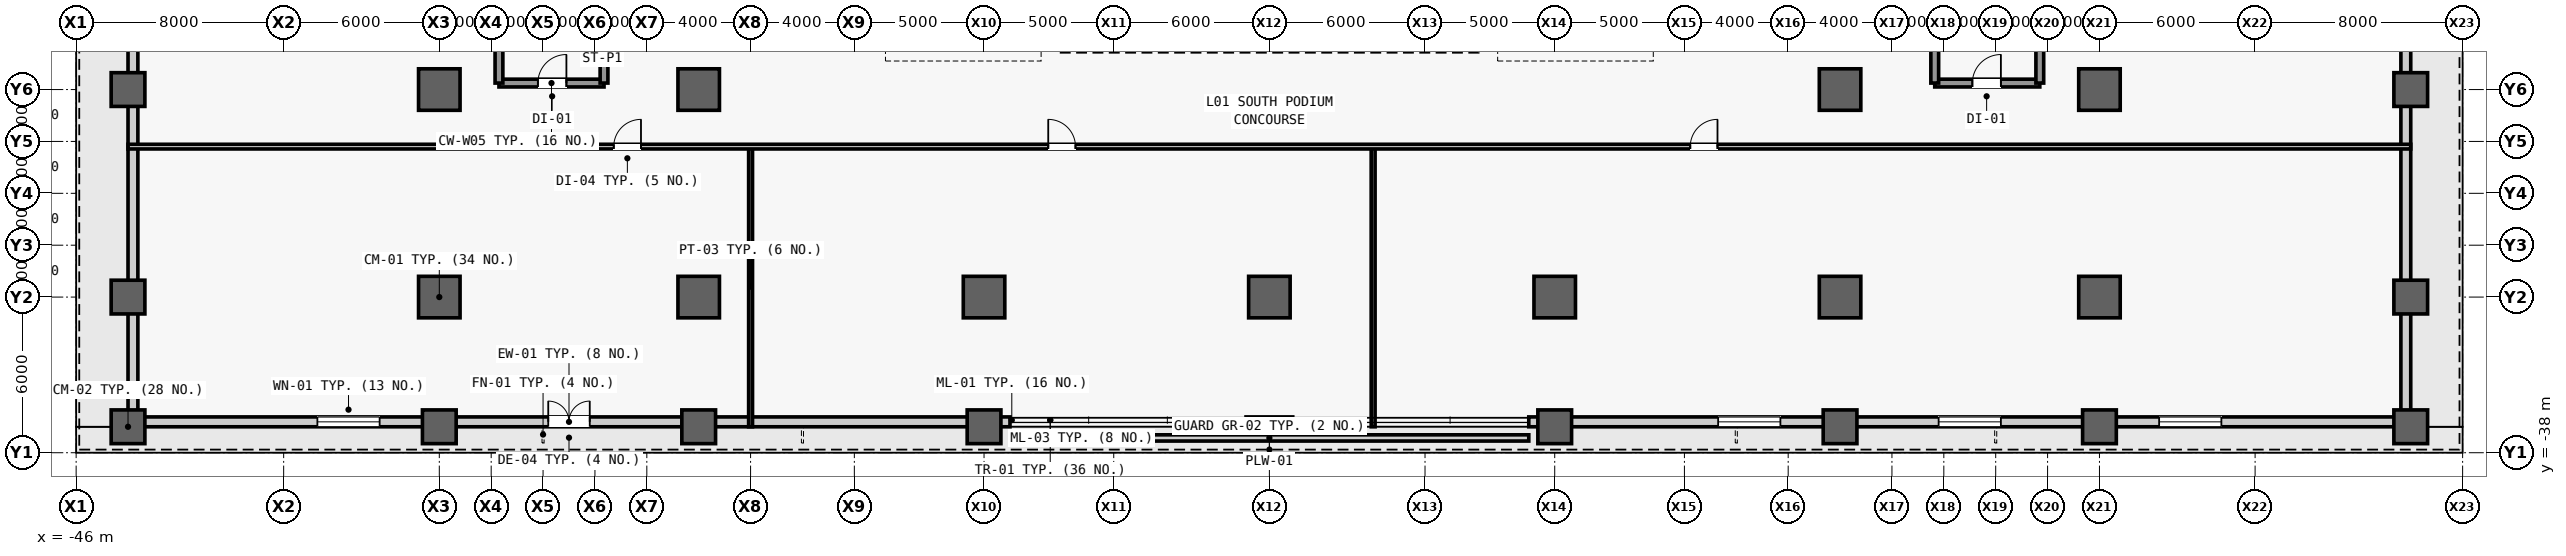
"""IFC4 building model, lengths in metres.
Left out: names, types, materials, properties, quantities, classifications, styles, units other than length and angle.
Written with IfcOpenShell. Run it as: python <this file> out.ifc"""

import sys

from ifc_helpers import new_model, si_unit, direction, frame, frame_2d, origin, origin_2d, place, context, subcontext, project, spatial, rectangle, extrude, source, transform, mapped, element, fill, save


model = new_model("IFC4")
c1 = context("Model", 3, precision=1e-05, world=origin(), true_north=direction((0.0, 1.0)))
c2 = subcontext(c1, "Body", "Model", "MODEL_VIEW")
j1 = project(units=[si_unit("LENGTHUNIT", "METRE"), si_unit("PLANEANGLEUNIT", "RADIAN")], contexts=[c1])
p1 = place(None, origin())
s1 = spatial("IfcSite", under=j1, at=p1, CompositionType="ELEMENT")
p2 = place(p1, origin())
s2 = spatial("IfcBuilding", under=s1, at=p2, CompositionType="ELEMENT")
p3 = place(p2, frame((0.0, 0.0, 6.6)))
s3 = spatial("IfcBuildingStorey", under=s2, at=p3, CompositionType="ELEMENT", Elevation=6.6)
m1 = source(origin(), c2, "Body", "SweptSolid", [
    extrude(rectangle(XDim=1.3, YDim=1.3, at=origin_2d()), origin(), (0.0, 0.0, 1.0), 5.4),
])
for number, where, z_axis, x_axis in (
    (1, (-44.0, -37.0, 0.0), (0.0, 0.0, 1.0), (1.0, 0.0, 0.0)),
    (2, (-44.0, -24.0, 0.0), (0.0, 0.0, 1.0), (1.0, 0.0, 0.0)),
    (3, (-32.0, -37.0, 0.0), (0.0, 0.0, 1.0), (1.0, 0.0, 0.0)),
):
    element("IfcColumn", number, at=place(p3, frame(where, z_axis=z_axis, x_axis=x_axis)), inside=s3, PredefinedType="COLUMN", context=c2, shape_type="MappedRepresentation", body=[
        mapped(m1, transform((0.0, 0.0, 0.0), scale=1.0)),
    ])
m2 = source(origin(), c2, "Body", "SweptSolid", [
    extrude(rectangle(XDim=1.6, YDim=1.6, at=origin_2d()), origin(), (0.0, 0.0, 1.0), 5.4),
])
for number, where, z_axis, x_axis in (
    (4, (-32.0, -32.0, 0.0), (0.0, 0.0, 1.0), (1.0, 0.0, 0.0)),
    (5, (-32.0, -24.0, 0.0), (0.0, 0.0, 1.0), (1.0, 0.0, 0.0)),
):
    element("IfcColumn", number, at=place(p3, frame(where, z_axis=z_axis, x_axis=x_axis)), inside=s3, PredefinedType="COLUMN", context=c2, shape_type="MappedRepresentation", body=[
        mapped(m2, transform((0.0, 0.0, 0.0), scale=1.0)),
    ])
p4 = place(p3, frame((-22.0, -37.0, 0.0), z_axis=(0.0, 0.0, 1.0), x_axis=(1.0, 0.0, 0.0)))
e6 = element("IfcColumn", 6, at=p4, inside=s3, PredefinedType="COLUMN", context=c2, shape_type="MappedRepresentation", body=[
    mapped(m1, transform((0.0, 0.0, 0.0), scale=1.0)),
])
for number, where, z_axis, x_axis in (
    (7, (-22.0, -32.0, 0.0), (0.0, 0.0, 1.0), (1.0, 0.0, 0.0)),
    (8, (-22.0, -24.0, 0.0), (0.0, 0.0, 1.0), (1.0, 0.0, 0.0)),
):
    element("IfcColumn", number, at=place(p3, frame(where, z_axis=z_axis, x_axis=x_axis)), inside=s3, PredefinedType="COLUMN", context=c2, shape_type="MappedRepresentation", body=[
        mapped(m2, transform((0.0, 0.0, 0.0), scale=1.0)),
    ])
p5 = place(p3, frame((-11.0, -37.0, 0.0), z_axis=(0.0, 0.0, 1.0), x_axis=(1.0, 0.0, 0.0)))
e9 = element("IfcColumn", 9, at=p5, inside=s3, PredefinedType="COLUMN", context=c2, shape_type="MappedRepresentation", body=[
    mapped(m1, transform((0.0, 0.0, 0.0), scale=1.0)),
])
for number, where, z_axis, x_axis in (
    (10, (-11.0, -32.0, 0.0), (0.0, 0.0, 1.0), (1.0, 0.0, 0.0)),
    (11, (0.0, -32.0, 0.0), (0.0, 0.0, 1.0), (1.0, 0.0, 0.0)),
):
    element("IfcColumn", number, at=place(p3, frame(where, z_axis=z_axis, x_axis=x_axis)), inside=s3, PredefinedType="COLUMN", context=c2, shape_type="MappedRepresentation", body=[
        mapped(m2, transform((0.0, 0.0, 0.0), scale=1.0)),
    ])
p6 = place(p3, frame((11.0, -37.0, 0.0), z_axis=(0.0, 0.0, 1.0), x_axis=(1.0, 0.0, 0.0)))
e12 = element("IfcColumn", 12, at=p6, inside=s3, PredefinedType="COLUMN", context=c2, shape_type="MappedRepresentation", body=[
    mapped(m1, transform((0.0, 0.0, 0.0), scale=1.0)),
])
p7 = place(p3, frame((11.0, -32.0, 0.0), z_axis=(0.0, 0.0, 1.0), x_axis=(1.0, 0.0, 0.0)))
e13 = element("IfcColumn", 13, at=p7, inside=s3, PredefinedType="COLUMN", context=c2, shape_type="MappedRepresentation", body=[
    mapped(m2, transform((0.0, 0.0, 0.0), scale=1.0)),
])
p8 = place(p3, frame((22.0, -37.0, 0.0), z_axis=(0.0, 0.0, 1.0), x_axis=(1.0, 0.0, 0.0)))
e14 = element("IfcColumn", 14, at=p8, inside=s3, PredefinedType="COLUMN", context=c2, shape_type="MappedRepresentation", body=[
    mapped(m1, transform((0.0, 0.0, 0.0), scale=1.0)),
])
for number, where, z_axis, x_axis in (
    (15, (22.0, -32.0, 0.0), (0.0, 0.0, 1.0), (1.0, 0.0, 0.0)),
    (16, (22.0, -24.0, 0.0), (0.0, 0.0, 1.0), (1.0, 0.0, 0.0)),
):
    element("IfcColumn", number, at=place(p3, frame(where, z_axis=z_axis, x_axis=x_axis)), inside=s3, PredefinedType="COLUMN", context=c2, shape_type="MappedRepresentation", body=[
        mapped(m2, transform((0.0, 0.0, 0.0), scale=1.0)),
    ])
p9 = place(p3, frame((32.0, -37.0, 0.0), z_axis=(0.0, 0.0, 1.0), x_axis=(1.0, 0.0, 0.0)))
e17 = element("IfcColumn", 17, at=p9, inside=s3, PredefinedType="COLUMN", context=c2, shape_type="MappedRepresentation", body=[
    mapped(m1, transform((0.0, 0.0, 0.0), scale=1.0)),
])
for number, where, z_axis, x_axis in (
    (18, (32.0, -32.0, 0.0), (0.0, 0.0, 1.0), (1.0, 0.0, 0.0)),
    (19, (32.0, -24.0, 0.0), (0.0, 0.0, 1.0), (1.0, 0.0, 0.0)),
):
    element("IfcColumn", number, at=place(p3, frame(where, z_axis=z_axis, x_axis=x_axis)), inside=s3, PredefinedType="COLUMN", context=c2, shape_type="MappedRepresentation", body=[
        mapped(m2, transform((0.0, 0.0, 0.0), scale=1.0)),
    ])
for number, where, z_axis, x_axis in (
    (20, (44.0, -37.0, 0.0), (0.0, 0.0, 1.0), (1.0, 0.0, 0.0)),
    (21, (44.0, -24.0, 0.0), (0.0, 0.0, 1.0), (1.0, 0.0, 0.0)),
    (22, (-44.0, -32.0, 0.0), (0.0, 0.0, 1.0), (1.0, 0.0, 0.0)),
    (23, (44.0, -32.0, 0.0), (0.0, 0.0, 1.0), (1.0, 0.0, 0.0)),
):
    element("IfcColumn", number, at=place(p3, frame(where, z_axis=z_axis, x_axis=x_axis)), inside=s3, PredefinedType="COLUMN", context=c2, shape_type="MappedRepresentation", body=[
        mapped(m1, transform((0.0, 0.0, 0.0), scale=1.0)),
    ])
m3 = source(origin(), c2, "Body", "SweptSolid", [
    extrude(rectangle(XDim=34.0, YDim=0.38, at=frame_2d((17.0, 0.0))), origin(), (0.0, 0.0, 1.0), 3.28),
])
p10 = place(p3, frame((-44.0, -36.81, 0.0), z_axis=(0.0, 0.0, 1.0), x_axis=(1.0, 0.0, 0.0)))
e24 = element("IfcWall", 24, at=p10, inside=s3, PredefinedType="STANDARD", context=c2, shape_type="MappedRepresentation", body=[
    mapped(m3, transform((0.0, 0.0, 0.0), scale=1.0)),
])
m4 = source(origin(), c2, "Body", "SweptSolid", [
    extrude(rectangle(XDim=1.6, YDim=2.25, at=frame_2d((0.8, 1.125))), frame((0.0, 0.2, 0.0), z_axis=(0.0, -1.0, 0.0), x_axis=(1.0, 0.0, 0.0)), (0.0, 0.0, 1.0), 0.4),
])
p11 = place(p10, frame((16.2, 0.0, 0.0)))
e25 = element("IfcOpeningElement", 25, at=p11, cuts=e24, PredefinedType="OPENING", context=c2, shape_type="MappedRepresentation", body=[
    mapped(m4, transform((0.0, 0.0, 0.0), scale=1.0)),
])
m5 = source(origin(), c2, "Body", "SweptSolid", [
    extrude(rectangle(XDim=2.4, YDim=2.56, at=frame_2d((1.2, 1.28))), frame((0.0, 0.2, 0.0), z_axis=(0.0, -1.0, 0.0), x_axis=(1.0, 0.0, 0.0)), (0.0, 0.0, 1.0), 0.4),
])
p12 = place(p10, frame((7.3, 0.0, 0.5)))
e26 = element("IfcOpeningElement", 26, at=p12, cuts=e24, PredefinedType="OPENING", context=c2, shape_type="MappedRepresentation", body=[
    mapped(m5, transform((0.0, 0.0, 0.0), scale=1.0)),
])
m6 = source(origin(), c2, "Body", "SweptSolid", [
    extrude(rectangle(XDim=1.8, YDim=0.38, at=frame_2d((0.9, 0.0))), origin(), (0.0, 0.0, 1.0), 3.28),
])
p13 = place(p3, frame((-0.9, -36.81, 0.0), z_axis=(0.0, 0.0, 1.0), x_axis=(1.0, 0.0, 0.0)))
e27 = element("IfcWall", 27, at=p13, inside=s3, PredefinedType="STANDARD", context=c2, shape_type="MappedRepresentation", body=[
    mapped(m6, transform((0.0, 0.0, 0.0), scale=1.0)),
])
p14 = place(p3, frame((10.0, -36.81, 0.0), z_axis=(0.0, 0.0, 1.0), x_axis=(1.0, 0.0, 0.0)))
e28 = element("IfcWall", 28, at=p14, inside=s3, PredefinedType="STANDARD", context=c2, shape_type="MappedRepresentation", body=[
    mapped(m3, transform((0.0, 0.0, 0.0), scale=1.0)),
])
p15 = place(p14, frame((7.3, 0.0, 0.5)))
e29 = element("IfcOpeningElement", 29, at=p15, cuts=e28, PredefinedType="OPENING", context=c2, shape_type="MappedRepresentation", body=[
    mapped(m5, transform((0.0, 0.0, 0.0), scale=1.0)),
])
p16 = place(p14, frame((15.8, 0.0, 0.5)))
e30 = element("IfcOpeningElement", 30, at=p16, cuts=e28, PredefinedType="OPENING", context=c2, shape_type="MappedRepresentation", body=[
    mapped(m5, transform((0.0, 0.0, 0.0), scale=1.0)),
])
p17 = place(p14, frame((24.3, 0.0, 0.5)))
e31 = element("IfcOpeningElement", 31, at=p17, cuts=e28, PredefinedType="OPENING", context=c2, shape_type="MappedRepresentation", body=[
    mapped(m5, transform((0.0, 0.0, 0.0), scale=1.0)),
])
m7 = source(origin(), c2, "Body", "SweptSolid", [
    extrude(rectangle(XDim=73.24, YDim=0.38, at=frame_2d((36.62, 0.0))), origin(), (0.0, 0.0, 1.0), 3.28),
])
p18 = place(p3, frame((-43.81, -36.62, 0.0), z_axis=(0.0, 0.0, 1.0), x_axis=(0.0, 1.0, 0.0)))
e32 = element("IfcWall", 32, at=p18, inside=s3, PredefinedType="STANDARD", context=c2, shape_type="MappedRepresentation", body=[
    mapped(m7, transform((0.0, 0.0, 0.0), scale=1.0)),
])
p19 = place(p18, frame((41.82, 0.0, 0.0)))
e33 = element("IfcOpeningElement", 33, at=p19, cuts=e32, PredefinedType="OPENING", context=c2, shape_type="MappedRepresentation", body=[
    mapped(m4, transform((0.0, 0.0, 0.0), scale=1.0)),
])
p20 = place(p18, frame((17.11, 0.0, 0.5)))
e34 = element("IfcOpeningElement", 34, at=p20, cuts=e32, PredefinedType="OPENING", context=c2, shape_type="MappedRepresentation", body=[
    mapped(m5, transform((0.0, 0.0, 0.0), scale=1.0)),
])
p21 = place(p18, frame((53.73, 0.0, 0.5)))
e35 = element("IfcOpeningElement", 35, at=p21, cuts=e32, PredefinedType="OPENING", context=c2, shape_type="MappedRepresentation", body=[
    mapped(m5, transform((0.0, 0.0, 0.0), scale=1.0)),
])
p22 = place(p3, frame((43.81, -36.62, 0.0), z_axis=(0.0, 0.0, 1.0), x_axis=(0.0, 1.0, 0.0)))
e36 = element("IfcWall", 36, at=p22, inside=s3, PredefinedType="STANDARD", context=c2, shape_type="MappedRepresentation", body=[
    mapped(m7, transform((0.0, 0.0, 0.0), scale=1.0)),
])
p23 = place(p22, frame((41.82, 0.0, 0.0)))
e37 = element("IfcOpeningElement", 37, at=p23, cuts=e36, PredefinedType="OPENING", context=c2, shape_type="MappedRepresentation", body=[
    mapped(m4, transform((0.0, 0.0, 0.0), scale=1.0)),
])
p24 = place(p22, frame((17.11, 0.0, 0.5)))
e38 = element("IfcOpeningElement", 38, at=p24, cuts=e36, PredefinedType="OPENING", context=c2, shape_type="MappedRepresentation", body=[
    mapped(m5, transform((0.0, 0.0, 0.0), scale=1.0)),
])
p25 = place(p22, frame((53.73, 0.0, 0.5)))
e39 = element("IfcOpeningElement", 39, at=p25, cuts=e36, PredefinedType="OPENING", context=c2, shape_type="MappedRepresentation", body=[
    mapped(m5, transform((0.0, 0.0, 0.0), scale=1.0)),
])
m8 = source(origin(), c2, "Body", "SweptSolid", [
    extrude(rectangle(XDim=20.0, YDim=0.24, at=frame_2d((10.0, 0.0))), origin(), (0.0, 0.0, 1.0), 0.65),
])
p26 = place(p3, frame((-10.0, -37.43, 0.0), z_axis=(0.0, 0.0, 1.0), x_axis=(1.0, 0.0, 0.0)))
e40 = element("IfcWall", 40, at=p26, inside=s3, PredefinedType="STANDARD", context=c2, shape_type="MappedRepresentation", body=[
    mapped(m8, transform((0.0, 0.0, 0.0), scale=1.0)),
])
m9 = source(origin(), c2, "Body", "SweptSolid", [
    extrude(rectangle(XDim=4.05, YDim=0.3, at=frame_2d((2.025, 0.0))), origin(), (0.0, 0.0, 1.0), 5.08),
])
p27 = place(p3, frame((-29.7, -23.75, 0.0), z_axis=(0.0, 0.0, 1.0), x_axis=(1.0, 0.0, 0.0)))
e41 = element("IfcWall", 41, at=p27, inside=s3, PredefinedType="SHEAR", context=c2, shape_type="MappedRepresentation", body=[
    mapped(m9, transform((0.0, 0.0, 0.0), scale=1.0)),
])
m10 = source(origin(), c2, "Body", "SweptSolid", [
    extrude(rectangle(XDim=1.1, YDim=2.2, at=frame_2d((0.55, 1.1))), frame((0.0, 0.16, 0.0), z_axis=(0.0, -1.0, 0.0), x_axis=(1.0, 0.0, 0.0)), (0.0, 0.0, 1.0), 0.32),
])
p28 = place(p27, frame((1.5, 0.0, 0.0)))
e42 = element("IfcOpeningElement", 42, at=p28, cuts=e41, PredefinedType="OPENING", context=c2, shape_type="MappedRepresentation", body=[
    mapped(m10, transform((0.0, 0.0, 0.0), scale=1.0)),
])
m11 = source(origin(), c2, "Body", "SweptSolid", [
    extrude(rectangle(XDim=10.5, YDim=0.3, at=frame_2d((5.25, 0.0))), origin(), (0.0, 0.0, 1.0), 5.08),
])
for number, where, z_axis, x_axis in (
    (43, (-29.7, -23.75, 0.0), (0.0, 0.0, 1.0), (0.0, 1.0, 0.0)),
    (44, (-25.65, -23.75, 0.0), (0.0, 0.0, 1.0), (0.0, 1.0, 0.0)),
):
    element("IfcWall", number, at=place(p3, frame(where, z_axis=z_axis, x_axis=x_axis)), inside=s3, PredefinedType="SHEAR", context=c2, shape_type="MappedRepresentation", body=[
        mapped(m11, transform((0.0, 0.0, 0.0), scale=1.0)),
    ])
p29 = place(p3, frame((25.65, -23.75, 0.0), z_axis=(0.0, 0.0, 1.0), x_axis=(1.0, 0.0, 0.0)))
e45 = element("IfcWall", 45, at=p29, inside=s3, PredefinedType="SHEAR", context=c2, shape_type="MappedRepresentation", body=[
    mapped(m9, transform((0.0, 0.0, 0.0), scale=1.0)),
])
p30 = place(p29, frame((1.45, 0.0, 0.0)))
e46 = element("IfcOpeningElement", 46, at=p30, cuts=e45, PredefinedType="OPENING", context=c2, shape_type="MappedRepresentation", body=[
    mapped(m10, transform((0.0, 0.0, 0.0), scale=1.0)),
])
for number, where, z_axis, x_axis in (
    (47, (25.65, -23.75, 0.0), (0.0, 0.0, 1.0), (0.0, 1.0, 0.0)),
    (48, (29.7, -23.75, 0.0), (0.0, 0.0, 1.0), (0.0, 1.0, 0.0)),
):
    element("IfcWall", number, at=place(p3, frame(where, z_axis=z_axis, x_axis=x_axis)), inside=s3, PredefinedType="SHEAR", context=c2, shape_type="MappedRepresentation", body=[
        mapped(m11, transform((0.0, 0.0, 0.0), scale=1.0)),
    ])
m12 = source(origin(), c2, "Body", "SweptSolid", [
    extrude(rectangle(XDim=10.8, YDim=0.15, at=frame_2d((5.4, 0.0))), origin(), (0.0, 0.0, 1.0), 5.08),
])
for number, where, z_axis, x_axis in (
    (49, (-20.0, -37.0, 0.0), (0.0, 0.0, 1.0), (0.0, 1.0, 0.0)),
    (50, (4.0, -37.0, 0.0), (0.0, 0.0, 1.0), (0.0, 1.0, 0.0)),
):
    element("IfcWall", number, at=place(p3, frame(where, z_axis=z_axis, x_axis=x_axis)), inside=s3, PredefinedType="PARTITIONING", context=c2, shape_type="MappedRepresentation", body=[
        mapped(m12, transform((0.0, 0.0, 0.0), scale=1.0)),
    ])
m13 = source(origin(), c2, "Body", "SweptSolid", [
    extrude(rectangle(XDim=88.0, YDim=0.18, at=frame_2d((44.0, 0.0))), origin(), (0.0, 0.0, 1.0), 5.08),
])
p31 = place(p3, frame((-44.0, -26.2, 0.0), z_axis=(0.0, 0.0, 1.0), x_axis=(1.0, 0.0, 0.0)))
e51 = element("IfcWall", 51, at=p31, inside=s3, PredefinedType="PARTITIONING", context=c2, shape_type="MappedRepresentation", body=[
    mapped(m13, transform((0.0, 0.0, 0.0), scale=1.0)),
])
m14 = source(origin(), c2, "Body", "SweptSolid", [
    extrude(rectangle(XDim=1.05, YDim=2.2, at=frame_2d((0.525, 1.1))), frame((0.0, 0.1, 0.0), z_axis=(0.0, -1.0, 0.0), x_axis=(1.0, 0.0, 0.0)), (0.0, 0.0, 1.0), 0.2),
])
p32 = place(p31, frame((18.725, 0.0, 0.0)))
e52 = element("IfcOpeningElement", 52, at=p32, cuts=e51, PredefinedType="OPENING", context=c2, shape_type="MappedRepresentation", body=[
    mapped(m14, transform((0.0, 0.0, 0.0), scale=1.0)),
])
p33 = place(p31, frame((35.475, 0.0, 0.0)))
e53 = element("IfcOpeningElement", 53, at=p33, cuts=e51, PredefinedType="OPENING", context=c2, shape_type="MappedRepresentation", body=[
    mapped(m14, transform((0.0, 0.0, 0.0), scale=1.0)),
])
p34 = place(p31, frame((60.225, 0.0, 0.0)))
e54 = element("IfcOpeningElement", 54, at=p34, cuts=e51, PredefinedType="OPENING", context=c2, shape_type="MappedRepresentation", body=[
    mapped(m14, transform((0.0, 0.0, 0.0), scale=1.0)),
])
m15 = source(origin(), c2, "Body", "SweptSolid", [
    extrude(rectangle(XDim=1.6, YDim=2.25, at=frame_2d((0.8, 1.125))), frame((0.0, 0.025, 0.0), z_axis=(0.0, -1.0, 0.0), x_axis=(1.0, 0.0, 0.0)), (0.0, 0.0, 1.0), 0.05),
])
p35 = place(p11, origin())
e55 = element("IfcDoor", 55, at=p35, inside=s3, OperationType="DOUBLE_DOOR_SINGLE_SWING", PredefinedType="DOOR", context=c2, shape_type="MappedRepresentation", body=[
    mapped(m15, transform((0.0, 0.0, 0.0), scale=1.0)),
])
fill(e25, e55)
m16 = source(origin(), c2, "Body", "SweptSolid", [
    extrude(rectangle(XDim=2.4, YDim=2.56, at=frame_2d((1.2, 1.28))), frame((0.0, 0.03, 0.0), z_axis=(0.0, -1.0, 0.0), x_axis=(1.0, 0.0, 0.0)), (0.0, 0.0, 1.0), 0.06),
])
p36 = place(p12, origin())
e56 = element("IfcWindow", 56, at=p36, inside=s3, PartitioningType="SINGLE_PANEL", PredefinedType="WINDOW", context=c2, shape_type="MappedRepresentation", body=[
    mapped(m16, transform((0.0, 0.0, 0.0), scale=1.0)),
])
fill(e26, e56)
p37 = place(p15, origin())
e57 = element("IfcWindow", 57, at=p37, inside=s3, PartitioningType="SINGLE_PANEL", PredefinedType="WINDOW", context=c2, shape_type="MappedRepresentation", body=[
    mapped(m16, transform((0.0, 0.0, 0.0), scale=1.0)),
])
fill(e29, e57)
p38 = place(p16, origin())
e58 = element("IfcWindow", 58, at=p38, inside=s3, PartitioningType="SINGLE_PANEL", PredefinedType="WINDOW", context=c2, shape_type="MappedRepresentation", body=[
    mapped(m16, transform((0.0, 0.0, 0.0), scale=1.0)),
])
fill(e30, e58)
p39 = place(p17, origin())
e59 = element("IfcWindow", 59, at=p39, inside=s3, PartitioningType="SINGLE_PANEL", PredefinedType="WINDOW", context=c2, shape_type="MappedRepresentation", body=[
    mapped(m16, transform((0.0, 0.0, 0.0), scale=1.0)),
])
fill(e31, e59)
m17 = source(origin(), c2, "Body", "SweptSolid", [
    extrude(rectangle(XDim=1.1, YDim=2.2, at=frame_2d((0.55, 1.1))), frame((0.0, 0.025, 0.0), z_axis=(0.0, -1.0, 0.0), x_axis=(1.0, 0.0, 0.0)), (0.0, 0.0, 1.0), 0.05),
])
p40 = place(p28, origin())
e60 = element("IfcDoor", 60, at=p40, inside=s3, OperationType="SINGLE_SWING_RIGHT", PredefinedType="DOOR", context=c2, shape_type="MappedRepresentation", body=[
    mapped(m17, transform((0.0, 0.0, 0.0), scale=1.0)),
])
fill(e42, e60)
p41 = place(p30, origin())
e61 = element("IfcDoor", 61, at=p41, inside=s3, OperationType="SINGLE_SWING_RIGHT", PredefinedType="DOOR", context=c2, shape_type="MappedRepresentation", body=[
    mapped(m17, transform((0.0, 0.0, 0.0), scale=1.0)),
])
fill(e46, e61)
m18 = source(origin(), c2, "Body", "SweptSolid", [
    extrude(rectangle(XDim=1.05, YDim=2.2, at=frame_2d((0.525, 1.1))), frame((0.0, 0.025, 0.0), z_axis=(0.0, -1.0, 0.0), x_axis=(1.0, 0.0, 0.0)), (0.0, 0.0, 1.0), 0.05),
])
p42 = place(p32, origin())
e62 = element("IfcDoor", 62, at=p42, inside=s3, OperationType="SINGLE_SWING_RIGHT", PredefinedType="DOOR", context=c2, shape_type="MappedRepresentation", body=[
    mapped(m18, transform((0.0, 0.0, 0.0), scale=1.0)),
])
fill(e52, e62)
p43 = place(p33, origin())
e63 = element("IfcDoor", 63, at=p43, inside=s3, OperationType="SINGLE_SWING_LEFT", PredefinedType="DOOR", context=c2, shape_type="MappedRepresentation", body=[
    mapped(m18, transform((0.0, 0.0, 0.0), scale=1.0)),
])
fill(e53, e63)
p44 = place(p34, origin())
e64 = element("IfcDoor", 64, at=p44, inside=s3, OperationType="SINGLE_SWING_RIGHT", PredefinedType="DOOR", context=c2, shape_type="MappedRepresentation", body=[
    mapped(m18, transform((0.0, 0.0, 0.0), scale=1.0)),
])
fill(e54, e64)
save(model, sys.argv[1])
